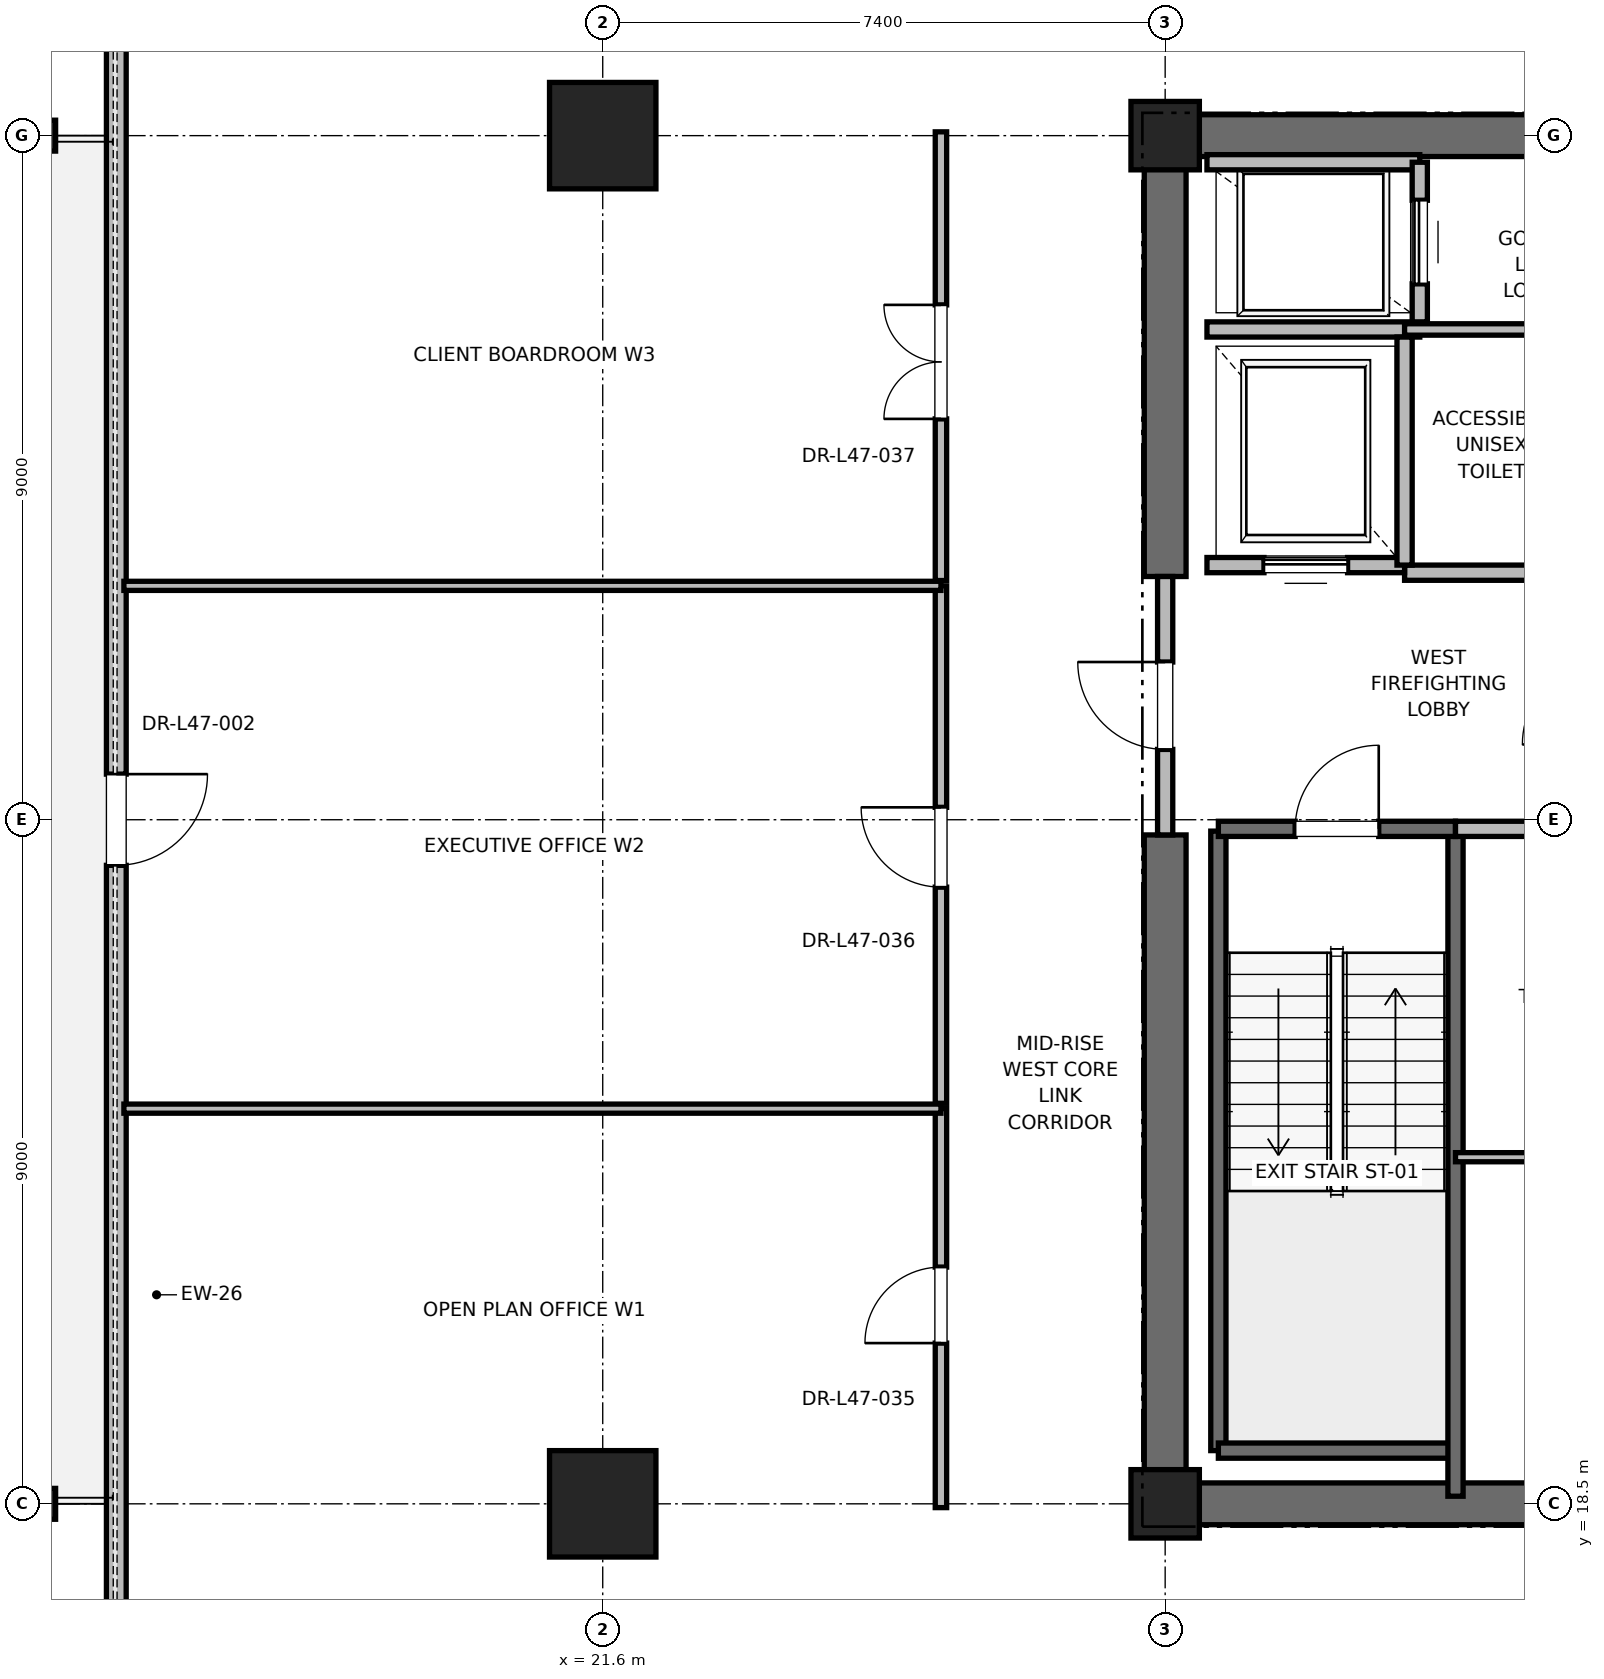
"""IFC4 building model, lengths in metres.
Left out: names, types, materials, properties, quantities, classifications, styles, units other than length and angle.
Written with IfcOpenShell. Run it as: python <this file> out.ifc"""

import sys

from ifc_helpers import new_model, si_unit, direction, frame, frame_2d, origin, origin_2d, place, context, subcontext, project, spatial, rectangle, i_section, extrude, element, fill, save


model = new_model("IFC4")
c1 = context("Model", 3, precision=1e-05, world=origin(), true_north=direction((0.0, 1.0)))
c2 = subcontext(c1, "Body", "Model", "MODEL_VIEW")
j1 = project(units=[si_unit("LENGTHUNIT", "METRE"), si_unit("PLANEANGLEUNIT", "RADIAN")], contexts=[c1])
p1 = place(None, origin())
s1 = spatial("IfcSite", under=j1, at=p1, CompositionType="ELEMENT")
p2 = place(p1, origin())
s2 = spatial("IfcBuilding", under=s1, at=p2, CompositionType="ELEMENT")
p3 = place(p2, frame((0.0, 0.0, 205.2)))
s3 = spatial("IfcBuildingStorey", under=s2, at=p3, CompositionType="ELEMENT", Elevation=205.2)
for number, where, z_axis, x_axis in (
    (1, (21.6, 18.5, 0.0), (0.0, 0.0, 1.0), (1.0, 0.0, 0.0)),
    (2, (21.6, 36.5, 0.0), (0.0, 0.0, 1.0), (1.0, 0.0, 0.0)),
):
    element("IfcColumn", number, at=place(p3, frame(where, z_axis=z_axis, x_axis=x_axis)), inside=s3, PredefinedType="COLUMN", context=c2, shape_type="SweptSolid", body=[
        extrude(rectangle(XDim=1.4, YDim=1.4, at=origin_2d()), origin(), (0.0, 0.0, 1.0), 4.0),
    ])
for number, where, z_axis, x_axis in (
    (3, (14.2, 18.5, 0.0), (0.0, 0.0, 1.0), (1.0, 0.0, 0.0)),
    (4, (14.2, 36.5, 0.0), (0.0, 0.0, 1.0), (1.0, 0.0, 0.0)),
):
    element("IfcColumn", number, at=place(p3, frame(where, z_axis=z_axis, x_axis=x_axis)), inside=s3, PredefinedType="COLUMN", context=c2, shape_type="SweptSolid", body=[
        extrude(i_section(OverallWidth=0.403, OverallDepth=0.406, WebThickness=0.027, FlangeThickness=0.043, FilletRadius=0.015, at=origin_2d()), origin(), (0.0, 0.0, 1.0), 4.0),
    ])
for number, where, z_axis, x_axis in (
    (5, (29.0, 18.5, 0.0), (0.0, 0.0, 1.0), (1.0, 0.0, 0.0)),
    (6, (29.0, 36.5, 0.0), (0.0, 0.0, 1.0), (1.0, 0.0, 0.0)),
):
    element("IfcColumn", number, at=place(p3, frame(where, z_axis=z_axis, x_axis=x_axis)), inside=s3, PredefinedType="PILASTER", context=c2, shape_type="SweptSolid", body=[
        extrude(rectangle(XDim=0.9, YDim=0.9, at=origin_2d()), origin(), (0.0, 0.0, 1.0), 4.0),
    ])
p4 = place(p3, frame((29.0, 18.5, 0.0), z_axis=(0.0, 0.0, 1.0), x_axis=(1.0, 0.0, 0.0)))
e7 = element("IfcWall", 7, at=p4, inside=s3, PredefinedType="SHEAR", context=c2, shape_type="SweptSolid", body=[
    extrude(rectangle(XDim=9.2, YDim=0.55, at=frame_2d((4.6, 0.0))), origin(), (0.0, 0.0, 1.0), 3.775),
])
p5 = place(p3, frame((29.0, 36.5, 0.0), z_axis=(0.0, 0.0, 1.0), x_axis=(1.0, 0.0, 0.0)))
e8 = element("IfcWall", 8, at=p5, inside=s3, PredefinedType="SHEAR", context=c2, shape_type="SweptSolid", body=[
    extrude(rectangle(XDim=5.8, YDim=0.55, at=frame_2d((2.9, 0.0))), origin(), (0.0, 0.0, 1.0), 3.775),
])
p6 = place(p3, frame((29.0, 18.5, 0.0), z_axis=(0.0, 0.0, 1.0), x_axis=(0.0, 1.0, 0.0)))
e9 = element("IfcWall", 9, at=p6, inside=s3, PredefinedType="SHEAR", context=c2, shape_type="SweptSolid", body=[
    extrude(rectangle(XDim=8.8, YDim=0.55, at=frame_2d((4.4, 0.0))), origin(), (0.0, 0.0, 1.0), 3.775),
])
p7 = place(p3, frame((29.0, 30.7, 0.0), z_axis=(0.0, 0.0, 1.0), x_axis=(0.0, 1.0, 0.0)))
e10 = element("IfcWall", 10, at=p7, inside=s3, PredefinedType="SHEAR", context=c2, shape_type="SweptSolid", body=[
    extrude(rectangle(XDim=5.8, YDim=0.55, at=frame_2d((2.9, 0.0))), origin(), (0.0, 0.0, 1.0), 3.775),
])
p8 = place(p3, frame((15.2, 45.6, 0.0), z_axis=(0.0, 0.0, 1.0), x_axis=(0.0, -1.0, 0.0)))
e11 = element("IfcWall", 11, at=p8, inside=s3, PredefinedType="PARAPET", context=c2, shape_type="SweptSolid", body=[
    extrude(rectangle(XDim=36.2, YDim=0.26, at=frame_2d((18.1, 0.0))), origin(), (0.0, 0.0, 1.0), 3.047),
])
p9 = place(p8, frame((4.2, 0.0, 0.85)))
e12 = element("IfcOpeningElement", 12, at=p9, cuts=e11, PredefinedType="OPENING", context=c2, shape_type="SweptSolid", body=[
    extrude(rectangle(XDim=2.0, YDim=2.3, at=frame_2d((1.0, 1.15))), frame((0.0, 0.13, 0.0), z_axis=(0.0, -1.0, 0.0), x_axis=(1.0, 0.0, 0.0)), (0.0, 0.0, 1.0), 0.26),
])
p10 = place(p8, frame((17.5, 0.0, 0.0)))
e13 = element("IfcOpeningElement", 13, at=p10, cuts=e11, PredefinedType="OPENING", context=c2, shape_type="SweptSolid", body=[
    extrude(rectangle(XDim=1.2, YDim=2.2, at=frame_2d((0.6, 1.1))), frame((0.0, 0.13, 0.0), z_axis=(0.0, -1.0, 0.0), x_axis=(1.0, 0.0, 0.0)), (0.0, 0.0, 1.0), 0.26),
])
p11 = place(p8, frame((30.0, 0.0, 0.85)))
e14 = element("IfcOpeningElement", 14, at=p11, cuts=e11, PredefinedType="OPENING", context=c2, shape_type="SweptSolid", body=[
    extrude(rectangle(XDim=2.0, YDim=2.3, at=frame_2d((1.0, 1.15))), frame((0.0, 0.13, 0.0), z_axis=(0.0, -1.0, 0.0), x_axis=(1.0, 0.0, 0.0)), (0.0, 0.0, 1.0), 0.26),
])
p12 = place(p3, frame((29.7, 19.2, 0.0), z_axis=(0.0, 0.0, 1.0), x_axis=(0.0, 1.0, 0.0)))
e15 = element("IfcWall", 15, at=p12, inside=s3, PredefinedType="SOLIDWALL", context=c2, shape_type="SweptSolid", body=[
    extrude(rectangle(XDim=8.15, YDim=0.2, at=frame_2d((4.075, 0.0))), origin(), (0.0, 0.0, 1.0), 3.775),
])
p13 = place(p3, frame((29.7, 19.2, 0.0), z_axis=(0.0, 0.0, 1.0), x_axis=(1.0, 0.0, 0.0)))
e16 = element("IfcWall", 16, at=p13, inside=s3, PredefinedType="SOLIDWALL", context=c2, shape_type="SweptSolid", body=[
    extrude(rectangle(XDim=3.12, YDim=0.2, at=frame_2d((1.56, 0.0))), origin(), (0.0, 0.0, 1.0), 3.775),
])
p14 = place(p3, frame((32.82, 18.6, 0.0), z_axis=(0.0, 0.0, 1.0), x_axis=(0.0, 1.0, 0.0)))
e17 = element("IfcWall", 17, at=p14, inside=s3, PredefinedType="SOLIDWALL", context=c2, shape_type="SweptSolid", body=[
    extrude(rectangle(XDim=8.78, YDim=0.2, at=frame_2d((4.39, 0.0))), origin(), (0.0, 0.0, 1.0), 3.775),
])
p15 = place(p3, frame((29.7, 27.38, 0.0), z_axis=(0.0, 0.0, 1.0), x_axis=(1.0, 0.0, 0.0)))
e18 = element("IfcWall", 18, at=p15, inside=s3, PredefinedType="SOLIDWALL", context=c2, shape_type="SweptSolid", body=[
    extrude(rectangle(XDim=3.12, YDim=0.2, at=frame_2d((1.56, 0.0))), origin(), (0.0, 0.0, 1.0), 3.775),
])
p16 = place(p15, frame((1.01, 0.0, 0.0)))
e19 = element("IfcOpeningElement", 19, at=p16, cuts=e18, PredefinedType="OPENING", context=c2, shape_type="SweptSolid", body=[
    extrude(rectangle(XDim=1.1, YDim=2.15, at=frame_2d((0.55, 1.075))), frame((0.0, 0.1, 0.0), z_axis=(0.0, -1.0, 0.0), x_axis=(1.0, 0.0, 0.0)), (0.0, 0.0, 1.0), 0.2),
])
p17 = place(p3, frame((29.0, 27.3, 0.0), z_axis=(0.0, 0.0, 1.0), x_axis=(0.0, 1.0, 0.0)))
e20 = element("IfcWall", 20, at=p17, inside=s3, PredefinedType="PARTITIONING", context=c2, shape_type="SweptSolid", body=[
    extrude(rectangle(XDim=3.4, YDim=0.2, at=frame_2d((1.7, 0.0))), origin(), (0.0, 0.0, 1.0), 2.755),
])
p18 = place(p17, frame((1.125, 0.0, 0.0)))
e21 = element("IfcOpeningElement", 21, at=p18, cuts=e20, PredefinedType="OPENING", context=c2, shape_type="SweptSolid", body=[
    extrude(rectangle(XDim=1.15, YDim=2.2, at=frame_2d((0.575, 1.1))), frame((0.0, 0.1, 0.0), z_axis=(0.0, -1.0, 0.0), x_axis=(1.0, 0.0, 0.0)), (0.0, 0.0, 1.0), 0.2),
])
p19 = place(p3, frame((32.82, 27.38, 0.0), z_axis=(0.0, 0.0, 1.0), x_axis=(1.0, 0.0, 0.0)))
e22 = element("IfcWall", 22, at=p19, inside=s3, PredefinedType="PARTITIONING", context=c2, shape_type="SweptSolid", body=[
    extrude(rectangle(XDim=5.62, YDim=0.2, at=frame_2d((2.81, 0.0))), origin(), (0.0, 0.0, 1.0), 3.775),
])
p20 = place(p3, frame((32.15, 30.75, 0.0), z_axis=(0.0, 0.0, 1.0), x_axis=(1.0, 0.0, 0.0)))
e23 = element("IfcWall", 23, at=p20, inside=s3, PredefinedType="PARTITIONING", context=c2, shape_type="SweptSolid", body=[
    extrude(rectangle(XDim=3.13, YDim=0.2, at=frame_2d((1.565, 0.0))), origin(), (0.0, 0.0, 1.0), 3.775),
])
p21 = place(p3, frame((29.55, 30.85, 0.0), z_axis=(0.0, 0.0, 1.0), x_axis=(1.0, 0.0, 0.0)))
e24 = element("IfcWall", 24, at=p21, inside=s3, PredefinedType="SOLIDWALL", context=c2, shape_type="SweptSolid", body=[
    extrude(rectangle(XDim=2.6, YDim=0.2, at=frame_2d((1.3, 0.0))), origin(), (0.0, 0.0, 1.0), 2.755),
])
p22 = place(p21, frame((0.75, 0.0, 0.0)))
e25 = element("IfcOpeningElement", 25, at=p22, cuts=e24, PredefinedType="OPENING", context=c2, shape_type="SweptSolid", body=[
    extrude(rectangle(XDim=1.1, YDim=2.2, at=frame_2d((0.55, 1.1))), frame((0.0, 0.1, 0.0), z_axis=(0.0, -1.0, 0.0), x_axis=(1.0, 0.0, 0.0)), (0.0, 0.0, 1.0), 0.2),
])
p23 = place(p3, frame((29.55, 33.95, 0.0), z_axis=(0.0, 0.0, 1.0), x_axis=(1.0, 0.0, 0.0)))
e26 = element("IfcWall", 26, at=p23, inside=s3, PredefinedType="SOLIDWALL", context=c2, shape_type="SweptSolid", body=[
    extrude(rectangle(XDim=2.8, YDim=0.2, at=frame_2d((1.4, 0.0))), origin(), (0.0, 0.0, 1.0), 3.775),
])
p24 = place(p3, frame((32.15, 30.85, 0.0), z_axis=(0.0, 0.0, 1.0), x_axis=(0.0, 1.0, 0.0)))
e27 = element("IfcWall", 27, at=p24, inside=s3, PredefinedType="SOLIDWALL", context=c2, shape_type="SweptSolid", body=[
    extrude(rectangle(XDim=3.0, YDim=0.2, at=frame_2d((1.5, 0.0))), origin(), (0.0, 0.0, 1.0), 3.775),
])
p25 = place(p3, frame((32.35, 36.15, 0.0), z_axis=(0.0, 0.0, 1.0), x_axis=(-1.0, 0.0, 0.0)))
e28 = element("IfcWall", 28, at=p25, inside=s3, PredefinedType="SOLIDWALL", context=c2, shape_type="SweptSolid", body=[
    extrude(rectangle(XDim=2.8, YDim=0.2, at=frame_2d((1.4, 0.0))), origin(), (0.0, 0.0, 1.0), 3.062),
])
p26 = place(p3, frame((32.35, 34.05, 0.0), z_axis=(0.0, 0.0, 1.0), x_axis=(0.0, 1.0, 0.0)))
e29 = element("IfcWall", 29, at=p26, inside=s3, PredefinedType="SOLIDWALL", context=c2, shape_type="SweptSolid", body=[
    extrude(rectangle(XDim=2.1, YDim=0.2, at=frame_2d((1.05, 0.0))), origin(), (0.0, 0.0, 1.0), 3.775),
])
p27 = place(p26, frame((0.5, 0.0, 0.0)))
e30 = element("IfcOpeningElement", 30, at=p27, cuts=e29, PredefinedType="OPENING", context=c2, shape_type="SweptSolid", body=[
    extrude(rectangle(XDim=1.1, YDim=2.2, at=frame_2d((0.55, 1.1))), frame((0.0, 0.1, 0.0), z_axis=(0.0, -1.0, 0.0), x_axis=(1.0, 0.0, 0.0)), (0.0, 0.0, 1.0), 0.2),
])
p28 = place(p3, frame((32.15, 33.95, 0.0), z_axis=(0.0, 0.0, 1.0), x_axis=(1.0, 0.0, 0.0)))
e31 = element("IfcWall", 31, at=p28, inside=s3, PredefinedType="PARTITIONING", context=c2, shape_type="SweptSolid", body=[
    extrude(rectangle(XDim=3.13, YDim=0.15, at=frame_2d((1.565, 0.0))), origin(), (0.0, 0.0, 1.0), 2.85),
])
p29 = place(p3, frame((32.82, 23.06, 0.0), z_axis=(0.0, 0.0, 1.0), x_axis=(1.0, 0.0, 0.0)))
e32 = element("IfcWall", 32, at=p29, inside=s3, PredefinedType="PARTITIONING", context=c2, shape_type="SweptSolid", body=[
    extrude(rectangle(XDim=5.23, YDim=0.12, at=frame_2d((2.615, 0.0))), origin(), (0.0, 0.0, 1.0), 2.85),
])
p30 = place(p3, frame((26.05, 18.45, 0.0), z_axis=(0.0, 0.0, 1.0), x_axis=(0.0, 1.0, 0.0)))
e33 = element("IfcWall", 33, at=p30, inside=s3, PredefinedType="PARTITIONING", context=c2, shape_type="SweptSolid", body=[
    extrude(rectangle(XDim=5.249, YDim=0.15, at=frame_2d((2.625, 0.0))), origin(), (0.0, 0.0, 1.0), 2.85),
])
p31 = place(p30, frame((2.165, 0.0, 0.0)))
e34 = element("IfcOpeningElement", 34, at=p31, cuts=e33, PredefinedType="OPENING", context=c2, shape_type="SweptSolid", body=[
    extrude(rectangle(XDim=1.0, YDim=2.15, at=frame_2d((0.5, 1.075))), frame((0.0, 0.075, 0.0), z_axis=(0.0, -1.0, 0.0), x_axis=(1.0, 0.0, 0.0)), (0.0, 0.0, 1.0), 0.15),
])
p32 = place(p3, frame((15.3, 23.699, 0.0), z_axis=(0.0, 0.0, 1.0), x_axis=(1.0, 0.0, 0.0)))
e35 = element("IfcWall", 35, at=p32, inside=s3, PredefinedType="PARTITIONING", context=c2, shape_type="SweptSolid", body=[
    extrude(rectangle(XDim=10.75, YDim=0.12, at=frame_2d((5.375, 0.0))), origin(), (0.0, 0.0, 1.0), 2.85),
])
p33 = place(p3, frame((26.05, 23.769, 0.0), z_axis=(0.0, 0.0, 1.0), x_axis=(0.0, 1.0, 0.0)))
e36 = element("IfcWall", 36, at=p33, inside=s3, PredefinedType="PARTITIONING", context=c2, shape_type="SweptSolid", body=[
    extrude(rectangle(XDim=6.808, YDim=0.15, at=frame_2d((3.404, 0.0))), origin(), (0.0, 0.0, 1.0), 2.85),
])
p34 = place(p33, frame((2.844, 0.0, 0.0)))
e37 = element("IfcOpeningElement", 37, at=p34, cuts=e36, PredefinedType="OPENING", context=c2, shape_type="SweptSolid", body=[
    extrude(rectangle(XDim=1.05, YDim=2.2, at=frame_2d((0.525, 1.1))), frame((0.0, 0.075, 0.0), z_axis=(0.0, -1.0, 0.0), x_axis=(1.0, 0.0, 0.0)), (0.0, 0.0, 1.0), 0.15),
])
p35 = place(p3, frame((15.3, 30.577, 0.0), z_axis=(0.0, 0.0, 1.0), x_axis=(1.0, 0.0, 0.0)))
e38 = element("IfcWall", 38, at=p35, inside=s3, PredefinedType="PARTITIONING", context=c2, shape_type="SweptSolid", body=[
    extrude(rectangle(XDim=10.75, YDim=0.12, at=frame_2d((5.375, 0.0))), origin(), (0.0, 0.0, 1.0), 2.85),
])
p36 = place(p3, frame((26.05, 30.647, 0.0), z_axis=(0.0, 0.0, 1.0), x_axis=(0.0, 1.0, 0.0)))
e39 = element("IfcWall", 39, at=p36, inside=s3, PredefinedType="PARTITIONING", context=c2, shape_type="SweptSolid", body=[
    extrude(rectangle(XDim=5.903, YDim=0.15, at=frame_2d((2.952, 0.0))), origin(), (0.0, 0.0, 1.0), 2.85),
])
p37 = place(p36, frame((2.126, 0.0, 0.0)))
e40 = element("IfcOpeningElement", 40, at=p37, cuts=e39, PredefinedType="OPENING", context=c2, shape_type="SweptSolid", body=[
    extrude(rectangle(XDim=1.5, YDim=2.25, at=frame_2d((0.75, 1.125))), frame((0.0, 0.075, 0.0), z_axis=(0.0, -1.0, 0.0), x_axis=(1.0, 0.0, 0.0)), (0.0, 0.0, 1.0), 0.15),
])
p38 = place(p10, origin())
e41 = element("IfcDoor", 41, at=p38, inside=s3, OperationType="SINGLE_SWING_LEFT", PredefinedType="DOOR", context=c2, shape_type="SweptSolid", body=[
    extrude(rectangle(XDim=1.2, YDim=2.2, at=frame_2d((0.6, 1.1))), frame((0.0, 0.025, 0.0), z_axis=(0.0, -1.0, 0.0), x_axis=(1.0, 0.0, 0.0)), (0.0, 0.0, 1.0), 0.05),
])
fill(e13, e41)
p39 = place(p16, origin())
e42 = element("IfcDoor", 42, at=p39, inside=s3, OperationType="SINGLE_SWING_RIGHT", PredefinedType="DOOR", context=c2, shape_type="SweptSolid", body=[
    extrude(rectangle(XDim=1.1, YDim=2.15, at=frame_2d((0.55, 1.075))), frame((0.0, 0.025, 0.0), z_axis=(0.0, -1.0, 0.0), x_axis=(1.0, 0.0, 0.0)), (0.0, 0.0, 1.0), 0.05),
])
fill(e19, e42)
p40 = place(p18, origin())
e43 = element("IfcDoor", 43, at=p40, inside=s3, OperationType="SINGLE_SWING_RIGHT", PredefinedType="DOOR", context=c2, shape_type="SweptSolid", body=[
    extrude(rectangle(XDim=1.15, YDim=2.2, at=frame_2d((0.575, 1.1))), frame((0.0, 0.025, 0.0), z_axis=(0.0, -1.0, 0.0), x_axis=(1.0, 0.0, 0.0)), (0.0, 0.0, 1.0), 0.05),
])
fill(e21, e43)
p41 = place(p22, origin())
e44 = element("IfcDoor", 44, at=p41, inside=s3, OperationType="SLIDING_TO_RIGHT", PredefinedType="DOOR", context=c2, shape_type="SweptSolid", body=[
    extrude(rectangle(XDim=1.1, YDim=2.2, at=frame_2d((0.55, 1.1))), frame((0.0, 0.025, 0.0), z_axis=(0.0, -1.0, 0.0), x_axis=(1.0, 0.0, 0.0)), (0.0, 0.0, 1.0), 0.05),
])
fill(e25, e44)
p42 = place(p27, origin())
e45 = element("IfcDoor", 45, at=p42, inside=s3, OperationType="SLIDING_TO_RIGHT", PredefinedType="DOOR", context=c2, shape_type="SweptSolid", body=[
    extrude(rectangle(XDim=1.1, YDim=2.2, at=frame_2d((0.55, 1.1))), frame((0.0, 0.025, 0.0), z_axis=(0.0, -1.0, 0.0), x_axis=(1.0, 0.0, 0.0)), (0.0, 0.0, 1.0), 0.05),
])
fill(e30, e45)
p43 = place(p31, origin())
e46 = element("IfcDoor", 46, at=p43, inside=s3, OperationType="SINGLE_SWING_LEFT", PredefinedType="DOOR", context=c2, shape_type="SweptSolid", body=[
    extrude(rectangle(XDim=1.0, YDim=2.15, at=frame_2d((0.5, 1.075))), frame((0.0, 0.025, 0.0), z_axis=(0.0, -1.0, 0.0), x_axis=(1.0, 0.0, 0.0)), (0.0, 0.0, 1.0), 0.05),
])
fill(e34, e46)
p44 = place(p34, origin())
e47 = element("IfcDoor", 47, at=p44, inside=s3, OperationType="SINGLE_SWING_RIGHT", PredefinedType="DOOR", context=c2, shape_type="SweptSolid", body=[
    extrude(rectangle(XDim=1.05, YDim=2.2, at=frame_2d((0.525, 1.1))), frame((0.0, 0.025, 0.0), z_axis=(0.0, -1.0, 0.0), x_axis=(1.0, 0.0, 0.0)), (0.0, 0.0, 1.0), 0.05),
])
fill(e37, e47)
p45 = place(p37, origin())
e48 = element("IfcDoor", 48, at=p45, inside=s3, OperationType="DOUBLE_DOOR_SINGLE_SWING", PredefinedType="DOOR", context=c2, shape_type="SweptSolid", body=[
    extrude(rectangle(XDim=1.5, YDim=2.25, at=frame_2d((0.75, 1.125))), frame((0.0, 0.025, 0.0), z_axis=(0.0, -1.0, 0.0), x_axis=(1.0, 0.0, 0.0)), (0.0, 0.0, 1.0), 0.05),
])
fill(e40, e48)
save(model, sys.argv[1])
